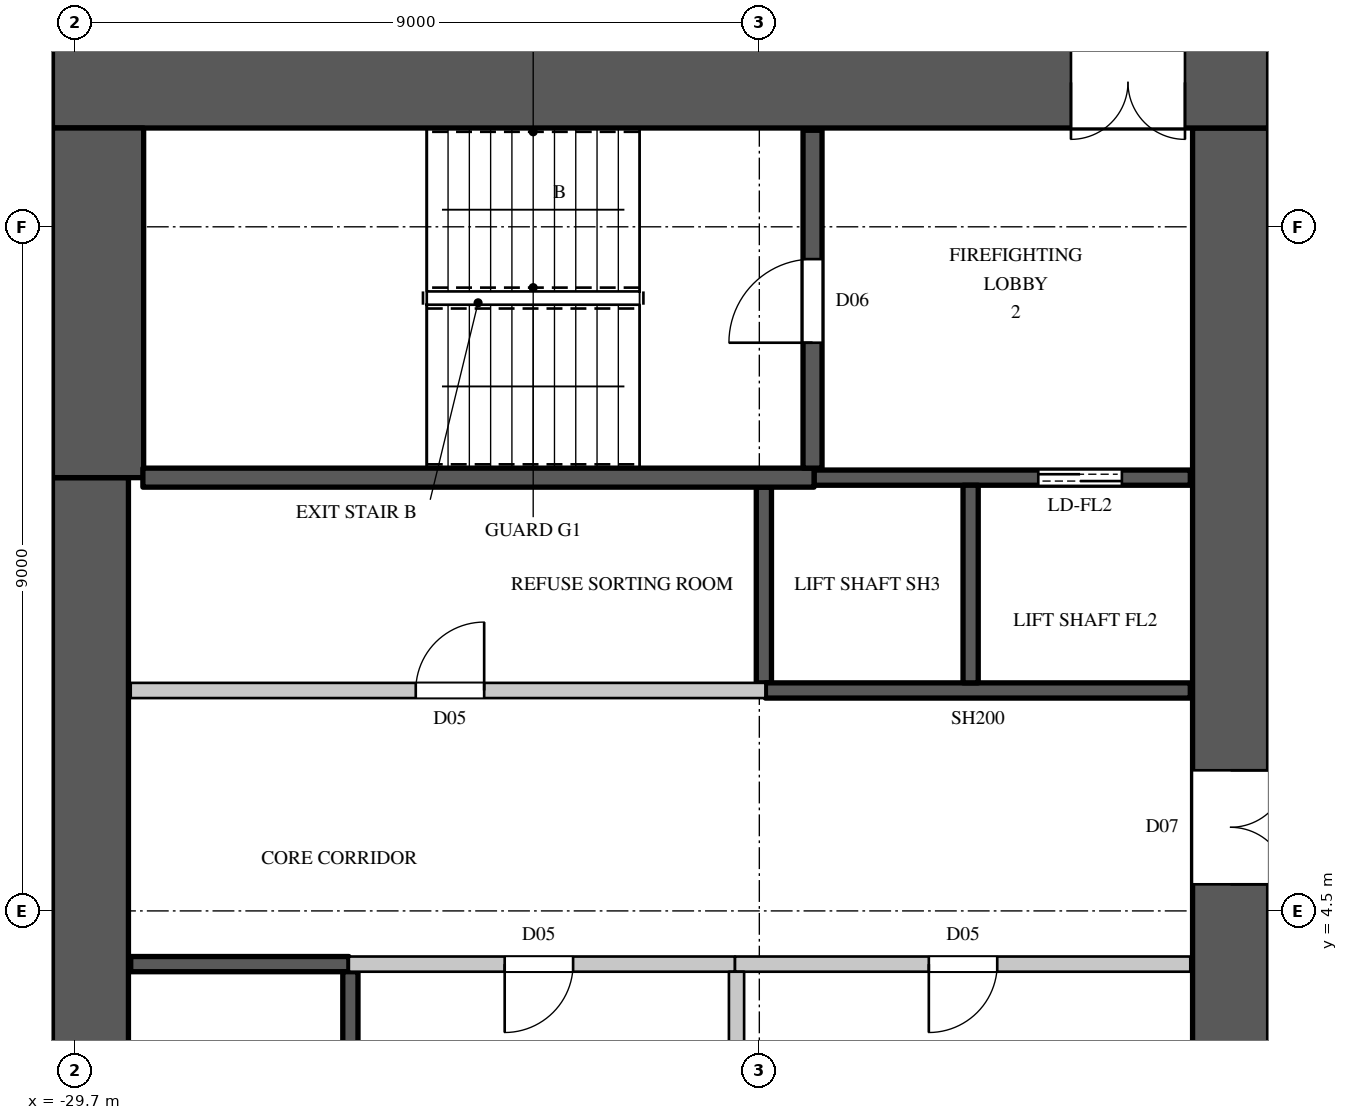
"""IFC4 building model, lengths in metres.
Left out: names, types, materials, properties, quantities, classifications, styles, units other than length and angle.
Written with IfcOpenShell. Run it as: python <this file> out.ifc"""

import sys

from ifc_helpers import new_model, si_unit, direction, frame, frame_2d, origin, place, context, subcontext, project, spatial, rectangle, extrude, element, fill, save


model = new_model("IFC4")
c1 = context("Model", 3, precision=1e-05, world=origin(), true_north=direction((0.0, 1.0)))
c2 = subcontext(c1, "Body", "Model", "MODEL_VIEW")
j1 = project(units=[si_unit("LENGTHUNIT", "METRE"), si_unit("PLANEANGLEUNIT", "RADIAN")], contexts=[c1])
p1 = place(None, origin())
s1 = spatial("IfcSite", under=j1, at=p1, CompositionType="ELEMENT")
p2 = place(p1, origin())
s2 = spatial("IfcBuilding", under=s1, at=p2, CompositionType="ELEMENT")
p3 = place(p2, frame((0.0, 0.0, 59.1)))
s3 = spatial("IfcBuildingStorey", under=s2, at=p3, CompositionType="ELEMENT", Elevation=59.1)
p4 = place(p3, frame((-30.0, 15.4, 0.0), z_axis=(0.0, 0.0, 1.0), x_axis=(1.0, 0.0, 0.0)))
e1 = element("IfcWall", 1, at=p4, inside=s3, PredefinedType="SHEAR", context=c2, shape_type="SweptSolid", body=[
    extrude(rectangle(XDim=16.0, YDim=1.2, at=frame_2d((8.0, 0.0))), origin(), (0.0, 0.0, 1.0), 3.6),
])
p5 = place(p4, frame((13.4, 0.0, 0.0)))
e2 = element("IfcOpeningElement", 2, at=p5, cuts=e1, PredefinedType="OPENING", context=c2, shape_type="SweptSolid", body=[
    extrude(rectangle(XDim=1.5, YDim=2.4, at=frame_2d((0.75, 1.2))), frame((0.0, 0.61, 0.0), z_axis=(0.0, -1.0, 0.0), x_axis=(1.0, 0.0, 0.0)), (0.0, 0.0, 1.0), 1.22),
])
p6 = place(p3, frame((-14.5, -14.8, 0.0), z_axis=(0.0, 0.0, 1.0), x_axis=(0.0, 1.0, 0.0)))
e3 = element("IfcWall", 3, at=p6, inside=s3, PredefinedType="SHEAR", context=c2, shape_type="SweptSolid", body=[
    extrude(rectangle(XDim=29.6, YDim=1.0, at=frame_2d((14.8, 0.0))), origin(), (0.0, 0.0, 1.0), 3.6),
])
p7 = place(p6, frame((8.45, 0.0, 0.0)))
e4 = element("IfcOpeningElement", 4, at=p7, cuts=e3, PredefinedType="OPENING", context=c2, shape_type="SweptSolid", body=[
    extrude(rectangle(XDim=1.5, YDim=2.4, at=frame_2d((0.75, 1.2))), frame((0.0, 0.51, 0.0), z_axis=(0.0, -1.0, 0.0), x_axis=(1.0, 0.0, 0.0)), (0.0, 0.0, 1.0), 1.02),
])
p8 = place(p6, frame((19.65, 0.0, 0.0)))
e5 = element("IfcOpeningElement", 5, at=p8, cuts=e3, PredefinedType="OPENING", context=c2, shape_type="SweptSolid", body=[
    extrude(rectangle(XDim=1.5, YDim=2.4, at=frame_2d((0.75, 1.2))), frame((0.0, 0.51, 0.0), z_axis=(0.0, -1.0, 0.0), x_axis=(1.0, 0.0, 0.0)), (0.0, 0.0, 1.0), 1.02),
])
p9 = place(p6, frame((14.5, 0.0, 0.0)))
e6 = element("IfcOpeningElement", 6, at=p9, cuts=e3, PredefinedType="OPENING", context=c2, shape_type="SweptSolid", body=[
    extrude(rectangle(XDim=0.6, YDim=2.0, at=frame_2d((0.3, 1.0))), frame((0.0, 0.51, 0.0), z_axis=(0.0, -1.0, 0.0), x_axis=(1.0, 0.0, 0.0)), (0.0, 0.0, 1.0), 1.02),
])
p10 = place(p3, frame((-29.5, -10.2, 0.0), z_axis=(0.0, 0.0, 1.0), x_axis=(0.0, 1.0, 0.0)))
e7 = element("IfcWall", 7, at=p10, inside=s3, PredefinedType="SHEAR", context=c2, shape_type="SweptSolid", body=[
    extrude(rectangle(XDim=20.4, YDim=1.0, at=frame_2d((10.2, 0.0))), origin(), (0.0, 0.0, 1.0), 3.6),
])
p11 = place(p3, frame((-29.4, 10.2, 0.0), z_axis=(0.0, 0.0, 1.0), x_axis=(0.0, 1.0, 0.0)))
e8 = element("IfcWall", 8, at=p11, inside=s3, PredefinedType="SHEAR", context=c2, shape_type="SweptSolid", body=[
    extrude(rectangle(XDim=4.6, YDim=1.2, at=frame_2d((2.3, 0.0))), origin(), (0.0, 0.0, 1.0), 3.6),
])
p12 = place(p3, frame((-28.97, 7.4, 0.0), z_axis=(0.0, 0.0, 1.0), x_axis=(1.0, 0.0, 0.0)))
e9 = element("IfcWall", 9, at=p12, inside=s3, PredefinedType="PARTITIONING", context=c2, shape_type="SweptSolid", body=[
    extrude(rectangle(XDim=8.35, YDim=0.2, at=frame_2d((4.175, 0.0))), origin(), (0.0, 0.0, 1.0), 3.3),
])
p13 = place(p12, frame((3.75, 0.0, 0.0)))
e10 = element("IfcOpeningElement", 10, at=p13, cuts=e9, PredefinedType="OPENING", context=c2, shape_type="SweptSolid", body=[
    extrude(rectangle(XDim=0.9, YDim=2.2, at=frame_2d((0.45, 1.1))), frame((0.0, 0.11, 0.0), z_axis=(0.0, -1.0, 0.0), x_axis=(1.0, 0.0, 0.0)), (0.0, 0.0, 1.0), 0.22),
])
p14 = place(p3, frame((-26.1, 3.8, 0.0), z_axis=(0.0, 0.0, 1.0), x_axis=(1.0, 0.0, 0.0)))
e11 = element("IfcWall", 11, at=p14, inside=s3, PredefinedType="PARTITIONING", context=c2, shape_type="SweptSolid", body=[
    extrude(rectangle(XDim=5.08, YDim=0.2, at=frame_2d((2.54, 0.0))), origin(), (0.0, 0.0, 1.0), 3.3),
])
p15 = place(p14, frame((2.05, 0.0, 0.0)))
e12 = element("IfcOpeningElement", 12, at=p15, cuts=e11, PredefinedType="OPENING", context=c2, shape_type="SweptSolid", body=[
    extrude(rectangle(XDim=0.9, YDim=2.2, at=frame_2d((0.45, 1.1))), frame((0.0, 0.11, 0.0), z_axis=(0.0, -1.0, 0.0), x_axis=(1.0, 0.0, 0.0)), (0.0, 0.0, 1.0), 0.22),
])
p16 = place(p3, frame((-21.02, 3.8, 0.0), z_axis=(0.0, 0.0, 1.0), x_axis=(1.0, 0.0, 0.0)))
e13 = element("IfcWall", 13, at=p16, inside=s3, PredefinedType="PARTITIONING", context=c2, shape_type="SweptSolid", body=[
    extrude(rectangle(XDim=5.99, YDim=0.2, at=frame_2d((2.995, 0.0))), origin(), (0.0, 0.0, 1.0), 3.3),
])
p17 = place(p16, frame((2.55, 0.0, 0.0)))
e14 = element("IfcOpeningElement", 14, at=p17, cuts=e13, PredefinedType="OPENING", context=c2, shape_type="SweptSolid", body=[
    extrude(rectangle(XDim=0.9, YDim=2.2, at=frame_2d((0.45, 1.1))), frame((0.0, 0.11, 0.0), z_axis=(0.0, -1.0, 0.0), x_axis=(1.0, 0.0, 0.0)), (0.0, 0.0, 1.0), 0.22),
])
p18 = place(p3, frame((-21.0, 1.1, 0.0), z_axis=(0.0, 0.0, 1.0), x_axis=(0.0, 1.0, 0.0)))
e15 = element("IfcWall", 15, at=p18, inside=s3, PredefinedType="PARTITIONING", context=c2, shape_type="SweptSolid", body=[
    extrude(rectangle(XDim=2.6, YDim=0.2, at=frame_2d((1.3, 0.0))), origin(), (0.0, 0.0, 1.0), 3.3),
])
p19 = place(p3, frame((-28.97, 3.8, 0.0), z_axis=(0.0, 0.0, 1.0), x_axis=(1.0, 0.0, 0.0)))
e16 = element("IfcWall", 16, at=p19, inside=s3, PredefinedType="SHEAR", context=c2, shape_type="SweptSolid", body=[
    extrude(rectangle(XDim=2.87, YDim=0.2, at=frame_2d((1.435, 0.0))), origin(), (0.0, 0.0, 1.0), 3.3),
])
p20 = place(p3, frame((-26.08, 1.1, 0.0), z_axis=(0.0, 0.0, 1.0), x_axis=(0.0, 1.0, 0.0)))
e17 = element("IfcWall", 17, at=p20, inside=s3, PredefinedType="SHEAR", context=c2, shape_type="SweptSolid", body=[
    extrude(rectangle(XDim=2.6, YDim=0.2, at=frame_2d((1.3, 0.0))), origin(), (0.0, 0.0, 1.0), 3.3),
])
p21 = place(p3, frame((-20.64, 7.5, 0.0), z_axis=(0.0, 0.0, 1.0), x_axis=(0.0, 1.0, 0.0)))
e18 = element("IfcWall", 18, at=p21, inside=s3, PredefinedType="SHEAR", context=c2, shape_type="SweptSolid", body=[
    extrude(rectangle(XDim=2.575, YDim=0.2, at=frame_2d((1.288, 0.0))), origin(), (0.0, 0.0, 1.0), 3.3),
])
p22 = place(p3, frame((-20.62, 7.4, 0.0), z_axis=(0.0, 0.0, 1.0), x_axis=(1.0, 0.0, 0.0)))
e19 = element("IfcWall", 19, at=p22, inside=s3, PredefinedType="SHEAR", context=c2, shape_type="SweptSolid", body=[
    extrude(rectangle(XDim=5.59, YDim=0.2, at=frame_2d((2.795, 0.0))), origin(), (0.0, 0.0, 1.0), 3.3),
])
p23 = place(p3, frame((-19.98, 10.2, 0.0), z_axis=(0.0, 0.0, 1.0), x_axis=(1.0, 0.0, 0.0)))
e20 = element("IfcWall", 20, at=p23, inside=s3, PredefinedType="SHEAR", context=c2, shape_type="SweptSolid", body=[
    extrude(rectangle(XDim=4.95, YDim=0.2, at=frame_2d((2.475, 0.0))), origin(), (0.0, 0.0, 1.0), 3.3),
])
p24 = place(p23, frame((2.95, 0.0, 0.0)))
e21 = element("IfcOpeningElement", 21, at=p24, cuts=e20, PredefinedType="OPENING", context=c2, shape_type="SweptSolid", body=[
    extrude(rectangle(XDim=1.1, YDim=2.2, at=frame_2d((0.55, 1.1))), frame((0.0, 0.11, 0.0), z_axis=(0.0, -1.0, 0.0), x_axis=(1.0, 0.0, 0.0)), (0.0, 0.0, 1.0), 0.22),
])
p25 = place(p3, frame((-17.92, 7.5, 0.0), z_axis=(0.0, 0.0, 1.0), x_axis=(0.0, 1.0, 0.0)))
e22 = element("IfcWall", 22, at=p25, inside=s3, PredefinedType="SHEAR", context=c2, shape_type="SweptSolid", body=[
    extrude(rectangle(XDim=2.6, YDim=0.2, at=frame_2d((1.3, 0.0))), origin(), (0.0, 0.0, 1.0), 3.6),
])
p26 = place(p3, frame((-28.81, 10.2, 0.0), z_axis=(0.0, 0.0, 1.0), x_axis=(1.0, 0.0, 0.0)))
e23 = element("IfcWall", 23, at=p26, inside=s3, PredefinedType="SHEAR", context=c2, shape_type="SweptSolid", body=[
    extrude(rectangle(XDim=8.83, YDim=0.25, at=frame_2d((4.415, 0.0))), origin(), (0.0, 0.0, 1.0), 3.3),
])
p27 = place(p3, frame((-20.0, 10.325, 0.0), z_axis=(0.0, 0.0, 1.0), x_axis=(0.0, 1.0, 0.0)))
e24 = element("IfcWall", 24, at=p27, inside=s3, PredefinedType="SHEAR", context=c2, shape_type="SweptSolid", body=[
    extrude(rectangle(XDim=4.445, YDim=0.25, at=frame_2d((2.223, 0.0))), origin(), (0.0, 0.0, 1.0), 3.3),
])
p28 = place(p27, frame((1.65, 0.0, 0.0)))
e25 = element("IfcOpeningElement", 25, at=p28, cuts=e24, PredefinedType="OPENING", context=c2, shape_type="SweptSolid", body=[
    extrude(rectangle(XDim=1.1, YDim=2.2, at=frame_2d((0.55, 1.1))), frame((0.0, 0.135, 0.0), z_axis=(0.0, -1.0, 0.0), x_axis=(1.0, 0.0, 0.0)), (0.0, 0.0, 1.0), 0.27),
])
p29 = place(p28, origin())
e26 = element("IfcDoor", 26, at=p29, inside=s3, OperationType="SINGLE_SWING_LEFT", PredefinedType="DOOR", context=c2, shape_type="SweptSolid", body=[
    extrude(rectangle(XDim=1.1, YDim=2.2, at=frame_2d((0.55, 1.1))), frame((0.0, 0.025, 0.0), z_axis=(0.0, -1.0, 0.0), x_axis=(1.0, 0.0, 0.0)), (0.0, 0.0, 1.0), 0.05),
])
fill(e25, e26)
p30 = place(p15, origin())
e27 = element("IfcDoor", 27, at=p30, inside=s3, OperationType="SINGLE_SWING_RIGHT", PredefinedType="DOOR", context=c2, shape_type="SweptSolid", body=[
    extrude(rectangle(XDim=0.9, YDim=2.2, at=frame_2d((0.45, 1.1))), frame((0.0, 0.025, 0.0), z_axis=(0.0, -1.0, 0.0), x_axis=(1.0, 0.0, 0.0)), (0.0, 0.0, 1.0), 0.05),
])
fill(e12, e27)
p31 = place(p17, origin())
e28 = element("IfcDoor", 28, at=p31, inside=s3, OperationType="SINGLE_SWING_RIGHT", PredefinedType="DOOR", context=c2, shape_type="SweptSolid", body=[
    extrude(rectangle(XDim=0.9, YDim=2.2, at=frame_2d((0.45, 1.1))), frame((0.0, 0.025, 0.0), z_axis=(0.0, -1.0, 0.0), x_axis=(1.0, 0.0, 0.0)), (0.0, 0.0, 1.0), 0.05),
])
fill(e14, e28)
p32 = place(p13, origin())
e29 = element("IfcDoor", 29, at=p32, inside=s3, OperationType="SINGLE_SWING_RIGHT", PredefinedType="DOOR", context=c2, shape_type="SweptSolid", body=[
    extrude(rectangle(XDim=0.9, YDim=2.2, at=frame_2d((0.45, 1.1))), frame((0.0, 0.025, 0.0), z_axis=(0.0, -1.0, 0.0), x_axis=(1.0, 0.0, 0.0)), (0.0, 0.0, 1.0), 0.05),
])
fill(e10, e29)
p33 = place(p24, origin())
e30 = element("IfcDoor", 30, at=p33, inside=s3, OperationType="DOUBLE_DOOR_SLIDING", PredefinedType="DOOR", context=c2, shape_type="SweptSolid", body=[
    extrude(rectangle(XDim=1.1, YDim=2.2, at=frame_2d((0.55, 1.1))), frame((0.0, 0.025, 0.0), z_axis=(0.0, -1.0, 0.0), x_axis=(1.0, 0.0, 0.0)), (0.0, 0.0, 1.0), 0.05),
])
fill(e21, e30)
p34 = place(p5, origin())
e31 = element("IfcDoor", 31, at=p34, inside=s3, OperationType="DOUBLE_DOOR_SINGLE_SWING", PredefinedType="DOOR", context=c2, shape_type="SweptSolid", body=[
    extrude(rectangle(XDim=1.5, YDim=2.4, at=frame_2d((0.75, 1.2))), frame((0.0, 0.025, 0.0), z_axis=(0.0, -1.0, 0.0), x_axis=(1.0, 0.0, 0.0)), (0.0, 0.0, 1.0), 0.05),
])
fill(e2, e31)
p35 = place(p8, origin())
e32 = element("IfcDoor", 32, at=p35, inside=s3, OperationType="DOUBLE_DOOR_SINGLE_SWING", PredefinedType="DOOR", context=c2, shape_type="SweptSolid", body=[
    extrude(rectangle(XDim=1.5, YDim=2.4, at=frame_2d((0.75, 1.2))), frame((0.0, -0.445, 0.0), z_axis=(0.0, -1.0, 0.0), x_axis=(1.0, 0.0, 0.0)), (0.0, 0.0, 1.0), 0.05),
])
fill(e5, e32)
save(model, sys.argv[1])
